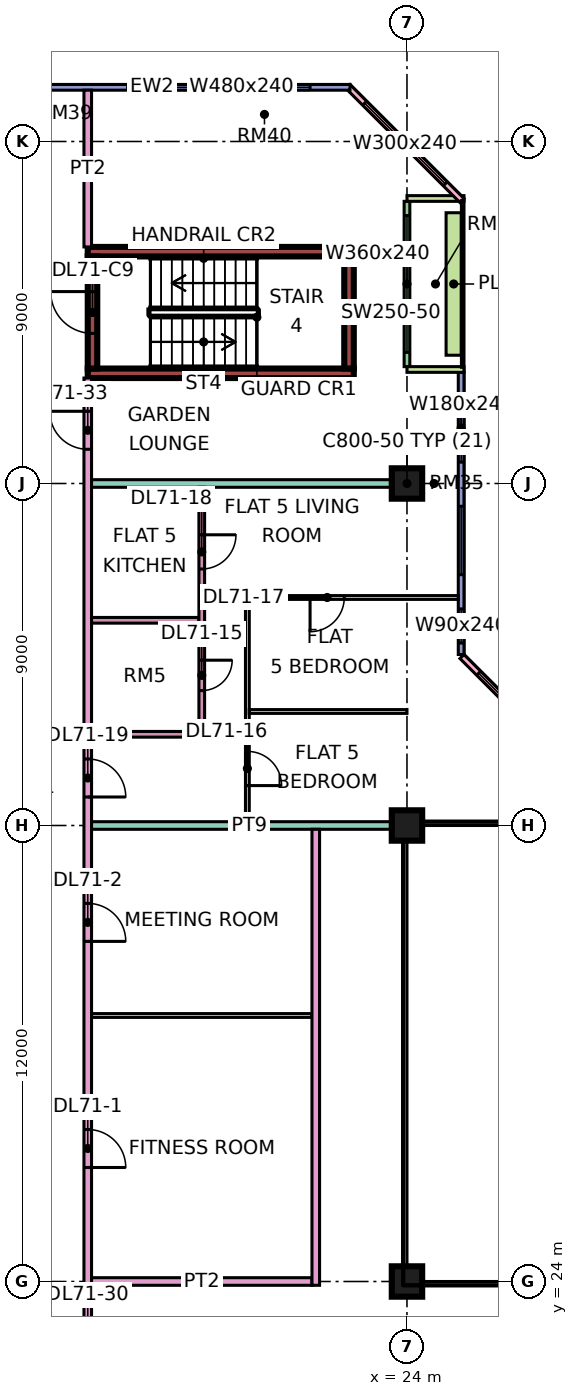
"""IFC4 building model, lengths in metres.
Left out: names, types, materials, properties, quantities, classifications, styles, units other than length and angle.
Written with IfcOpenShell. Run it as: python <this file> out.ifc"""

import sys

from ifc_helpers import new_model, si_unit, direction, frame, frame_2d, origin, origin_2d, place, context, subcontext, project, spatial, rectangle, extrude, element, fill, save


model = new_model("IFC4")
c1 = context("Model", 3, precision=1e-05, world=origin(), true_north=direction((0.0, 1.0)))
c2 = subcontext(c1, "Body", "Model", "MODEL_VIEW")
j1 = project(units=[si_unit("LENGTHUNIT", "METRE"), si_unit("PLANEANGLEUNIT", "RADIAN")], contexts=[c1])
p1 = place(None, origin())
s1 = spatial("IfcSite", under=j1, at=p1, CompositionType="ELEMENT")
p2 = place(p1, origin())
s2 = spatial("IfcBuilding", under=s1, at=p2, CompositionType="ELEMENT")
p3 = place(p2, frame((0.0, 0.0, 303.4)))
s3 = spatial("IfcBuildingStorey", under=s2, at=p3, CompositionType="ELEMENT", Elevation=303.4)
for number, where, z_axis, x_axis in (
    (1, (24.0, 24.0, 0.0), (0.0, 0.0, 1.0), (1.0, 0.0, 0.0)),
    (2, (24.0, 36.0, 0.0), (0.0, 0.0, 1.0), (1.0, 0.0, 0.0)),
    (3, (24.0, 45.0, 0.0), (0.0, 0.0, 1.0), (1.0, 0.0, 0.0)),
):
    element("IfcColumn", number, at=place(p3, frame(where, z_axis=z_axis, x_axis=x_axis)), inside=s3, PredefinedType="COLUMN", context=c2, shape_type="SweptSolid", body=[
        extrude(rectangle(XDim=0.8, YDim=0.8, at=origin_2d()), origin(), (0.0, 0.0, 1.0), 3.75),
    ])
for number, where, z_axis, x_axis in (
    (4, (15.6, 47.9, 0.0), (0.0, 0.0, 1.0), (1.0, 0.0, 0.0)),
    (5, (15.6, 51.1, 0.0), (0.0, 0.0, 1.0), (1.0, 0.0, 0.0)),
):
    element("IfcWall", number, at=place(p3, frame(where, z_axis=z_axis, x_axis=x_axis)), inside=s3, PredefinedType="SHEAR", context=c2, shape_type="SweptSolid", body=[
        extrude(rectangle(XDim=7.0, YDim=0.25, at=frame_2d((3.5, 0.0))), origin(), (0.0, 0.0, 1.0), 3.75),
    ])
p4 = place(p3, frame((15.725, 48.025, 0.0), z_axis=(0.0, 0.0, 1.0), x_axis=(0.0, 1.0, 0.0)))
e6 = element("IfcWall", 6, at=p4, inside=s3, PredefinedType="SHEAR", context=c2, shape_type="SweptSolid", body=[
    extrude(rectangle(XDim=2.95, YDim=0.25, at=frame_2d((1.475, 0.0))), origin(), (0.0, 0.0, 1.0), 3.75),
])
p5 = place(p4, frame((0.925, 0.0, 0.0)))
e7 = element("IfcOpeningElement", 7, at=p5, cuts=e6, PredefinedType="OPENING", context=c2, shape_type="SweptSolid", body=[
    extrude(rectangle(XDim=1.1, YDim=2.2, at=frame_2d((0.55, 1.1))), frame((0.0, 0.135, 0.0), z_axis=(0.0, -1.0, 0.0), x_axis=(1.0, 0.0, 0.0)), (0.0, 0.0, 1.0), 0.27),
])
p6 = place(p3, frame((22.475, 48.025, 0.0), z_axis=(0.0, 0.0, 1.0), x_axis=(0.0, 1.0, 0.0)))
e8 = element("IfcWall", 8, at=p6, inside=s3, PredefinedType="SHEAR", context=c2, shape_type="SweptSolid", body=[
    extrude(rectangle(XDim=2.95, YDim=0.25, at=frame_2d((1.475, 0.0))), origin(), (0.0, 0.0, 1.0), 3.75),
])
p7 = place(p3, frame((28.447, 37.447, 0.0), z_axis=(0.0, 0.0, 1.0), x_axis=(-0.707106781187, 0.707106781187, 0.0)))
e9 = element("IfcWall", 9, at=p7, inside=s3, PredefinedType="SOLIDWALL", context=c2, shape_type="SweptSolid", body=[
    extrude(rectangle(XDim=4.243, YDim=0.15, at=frame_2d((2.121, 0.0))), origin(), (0.0, 0.0, 1.0), 3.35),
])
p8 = place(p7, frame((0.621, 0.0, 0.45)))
e10 = element("IfcOpeningElement", 10, at=p8, cuts=e9, PredefinedType="OPENING", context=c2, shape_type="SweptSolid", body=[
    extrude(rectangle(XDim=3.0, YDim=2.4, at=frame_2d((1.5, 1.2))), frame((0.0, 0.085, 0.0), z_axis=(0.0, -1.0, 0.0), x_axis=(1.0, 0.0, 0.0)), (0.0, 0.0, 1.0), 0.17),
])
p9 = place(p3, frame((25.425, 40.5, 0.0), z_axis=(0.0, 0.0, 1.0), x_axis=(0.0, 1.0, 0.0)))
e11 = element("IfcWall", 11, at=p9, inside=s3, PredefinedType="SOLIDWALL", context=c2, shape_type="SweptSolid", body=[
    extrude(rectangle(XDim=7.425, YDim=0.15, at=frame_2d((3.712, 0.0))), origin(), (0.0, 0.0, 1.0), 3.35),
])
p10 = place(p9, frame((0.3, 0.0, 0.45)))
e12 = element("IfcOpeningElement", 12, at=p10, cuts=e11, PredefinedType="OPENING", context=c2, shape_type="SweptSolid", body=[
    extrude(rectangle(XDim=0.9, YDim=2.4, at=frame_2d((0.45, 1.2))), frame((0.0, 0.085, 0.0), z_axis=(0.0, -1.0, 0.0), x_axis=(1.0, 0.0, 0.0)), (0.0, 0.0, 1.0), 0.17),
])
p11 = place(p9, frame((2.1, 0.0, 0.45)))
e13 = element("IfcOpeningElement", 13, at=p11, cuts=e11, PredefinedType="OPENING", context=c2, shape_type="SweptSolid", body=[
    extrude(rectangle(XDim=1.8, YDim=2.4, at=frame_2d((0.9, 1.2))), frame((0.0, 0.085, 0.0), z_axis=(0.0, -1.0, 0.0), x_axis=(1.0, 0.0, 0.0)), (0.0, 0.0, 1.0), 0.17),
])
p12 = place(p9, frame((5.062, 0.0, 0.45)))
e14 = element("IfcOpeningElement", 14, at=p12, cuts=e11, PredefinedType="OPENING", context=c2, shape_type="SweptSolid", body=[
    extrude(rectangle(XDim=1.8, YDim=2.4, at=frame_2d((0.9, 1.2))), frame((0.0, 0.085, 0.0), z_axis=(0.0, -1.0, 0.0), x_axis=(1.0, 0.0, 0.0)), (0.0, 0.0, 1.0), 0.17),
])
p13 = place(p3, frame((24.0, 48.075, 0.0), z_axis=(0.0, 0.0, 1.0), x_axis=(0.0, 1.0, 0.0)))
e15 = element("IfcWall", 15, at=p13, inside=s3, PredefinedType="SOLIDWALL", context=c2, shape_type="SweptSolid", body=[
    extrude(rectangle(XDim=4.35, YDim=0.15, at=frame_2d((2.175, 0.0))), origin(), (0.0, 0.0, 1.0), 3.35),
])
p14 = place(p13, frame((0.375, 0.0, 0.45)))
e16 = element("IfcOpeningElement", 16, at=p14, cuts=e15, PredefinedType="OPENING", context=c2, shape_type="SweptSolid", body=[
    extrude(rectangle(XDim=3.6, YDim=2.4, at=frame_2d((1.8, 1.2))), frame((0.0, 0.085, 0.0), z_axis=(0.0, -1.0, 0.0), x_axis=(1.0, 0.0, 0.0)), (0.0, 0.0, 1.0), 0.17),
])
for number, where, z_axis, x_axis in (
    (17, (25.5, 48.0, 0.0), (0.0, 0.0, 1.0), (-1.0, 0.0, 0.0)),
    (18, (25.5, 52.5, 0.0), (0.0, 0.0, 1.0), (-1.0, 0.0, 0.0)),
):
    element("IfcWall", number, at=place(p3, frame(where, z_axis=z_axis, x_axis=x_axis)), inside=s3, PredefinedType="SOLIDWALL", context=c2, shape_type="SweptSolid", body=[
        extrude(rectangle(XDim=1.5, YDim=0.15, at=frame_2d((0.75, 0.0))), origin(), (0.0, 0.0, 1.0), 3.35),
    ])
p15 = place(p3, frame((25.447, 52.447, 0.0), z_axis=(0.0, 0.0, 1.0), x_axis=(-0.707106781187, 0.707106781187, 0.0)))
e19 = element("IfcWall", 19, at=p15, inside=s3, PredefinedType="SOLIDWALL", context=c2, shape_type="SweptSolid", body=[
    extrude(rectangle(XDim=4.243, YDim=0.15, at=frame_2d((2.121, 0.0))), origin(), (0.0, 0.0, 1.0), 3.35),
])
p16 = place(p15, frame((0.621, 0.0, 0.45)))
e20 = element("IfcOpeningElement", 20, at=p16, cuts=e19, PredefinedType="OPENING", context=c2, shape_type="SweptSolid", body=[
    extrude(rectangle(XDim=3.0, YDim=2.4, at=frame_2d((1.5, 1.2))), frame((0.0, 0.085, 0.0), z_axis=(0.0, -1.0, 0.0), x_axis=(1.0, 0.0, 0.0)), (0.0, 0.0, 1.0), 0.17),
])
p17 = place(p3, frame((22.5, 55.425, 0.0), z_axis=(0.0, 0.0, 1.0), x_axis=(-1.0, 0.0, 0.0)))
e21 = element("IfcWall", 21, at=p17, inside=s3, PredefinedType="SOLIDWALL", context=c2, shape_type="SweptSolid", body=[
    extrude(rectangle(XDim=10.425, YDim=0.15, at=frame_2d((5.212, 0.0))), origin(), (0.0, 0.0, 1.0), 3.35),
])
p18 = place(p17, frame((1.05, 0.0, 0.45)))
e22 = element("IfcOpeningElement", 22, at=p18, cuts=e21, PredefinedType="OPENING", context=c2, shape_type="SweptSolid", body=[
    extrude(rectangle(XDim=4.8, YDim=2.4, at=frame_2d((2.4, 1.2))), frame((0.0, 0.085, 0.0), z_axis=(0.0, -1.0, 0.0), x_axis=(1.0, 0.0, 0.0)), (0.0, 0.0, 1.0), 0.17),
])
p19 = place(p3, frame((25.229, 48.375, 0.0), z_axis=(0.0, 0.0, 1.0), x_axis=(0.0, 1.0, 0.0)))
e23 = element("IfcWall", 23, at=p19, inside=s3, PredefinedType="SOLIDWALL", context=c2, shape_type="SweptSolid", body=[
    extrude(rectangle(XDim=3.75, YDim=0.4, at=frame_2d((1.875, 0.0))), origin(), (0.0, 0.0, 1.0), 0.7),
])
p20 = place(p3, frame((15.6, 20.0, 0.0), z_axis=(0.0, 0.0, 1.0), x_axis=(0.0, 1.0, 0.0)))
e24 = element("IfcWall", 24, at=p20, inside=s3, PredefinedType="PARTITIONING", context=c2, shape_type="SweptSolid", body=[
    extrude(rectangle(XDim=27.775, YDim=0.2, at=frame_2d((13.887, 0.0))), origin(), (0.0, 0.0, 1.0), 3.35),
])
p21 = place(p20, frame((7.0, 0.0, 0.0)))
e25 = element("IfcOpeningElement", 25, at=p21, cuts=e24, PredefinedType="OPENING", context=c2, shape_type="SweptSolid", body=[
    extrude(rectangle(XDim=1.0, YDim=2.1, at=frame_2d((0.5, 1.05))), frame((0.0, 0.11, 0.0), z_axis=(0.0, -1.0, 0.0), x_axis=(1.0, 0.0, 0.0)), (0.0, 0.0, 1.0), 0.22),
])
p22 = place(p20, frame((12.95, 0.0, 0.0)))
e26 = element("IfcOpeningElement", 26, at=p22, cuts=e24, PredefinedType="OPENING", context=c2, shape_type="SweptSolid", body=[
    extrude(rectangle(XDim=1.0, YDim=2.1, at=frame_2d((0.5, 1.05))), frame((0.0, 0.11, 0.0), z_axis=(0.0, -1.0, 0.0), x_axis=(1.0, 0.0, 0.0)), (0.0, 0.0, 1.0), 0.22),
])
p23 = place(p20, frame((16.75, 0.0, 0.0)))
e27 = element("IfcOpeningElement", 27, at=p23, cuts=e24, PredefinedType="OPENING", context=c2, shape_type="SweptSolid", body=[
    extrude(rectangle(XDim=1.0, YDim=2.1, at=frame_2d((0.5, 1.05))), frame((0.0, 0.11, 0.0), z_axis=(0.0, -1.0, 0.0), x_axis=(1.0, 0.0, 0.0)), (0.0, 0.0, 1.0), 0.22),
])
p24 = place(p20, frame((1.15, 0.0, 0.0)))
e28 = element("IfcOpeningElement", 28, at=p24, cuts=e24, PredefinedType="OPENING", context=c2, shape_type="SweptSolid", body=[
    extrude(rectangle(XDim=1.8, YDim=2.1, at=frame_2d((0.9, 1.05))), frame((0.0, 0.11, 0.0), z_axis=(0.0, -1.0, 0.0), x_axis=(1.0, 0.0, 0.0)), (0.0, 0.0, 1.0), 0.22),
])
p25 = place(p20, frame((25.9, 0.0, 0.0)))
e29 = element("IfcOpeningElement", 29, at=p25, cuts=e24, PredefinedType="OPENING", context=c2, shape_type="SweptSolid", body=[
    extrude(rectangle(XDim=1.0, YDim=2.1, at=frame_2d((0.5, 1.05))), frame((0.0, 0.11, 0.0), z_axis=(0.0, -1.0, 0.0), x_axis=(1.0, 0.0, 0.0)), (0.0, 0.0, 1.0), 0.22),
])
p26 = place(p3, frame((15.6, 51.225, 0.0), z_axis=(0.0, 0.0, 1.0), x_axis=(0.0, 1.0, 0.0)))
e30 = element("IfcWall", 30, at=p26, inside=s3, PredefinedType="PARTITIONING", context=c2, shape_type="SweptSolid", body=[
    extrude(rectangle(XDim=4.125, YDim=0.2, at=frame_2d((2.062, 0.0))), origin(), (0.0, 0.0, 1.0), 3.35),
])
p27 = place(p3, frame((15.7, 24.0, 0.0), z_axis=(0.0, 0.0, 1.0), x_axis=(1.0, 0.0, 0.0)))
e31 = element("IfcWall", 31, at=p27, inside=s3, PredefinedType="PARTITIONING", context=c2, shape_type="SweptSolid", body=[
    extrude(rectangle(XDim=5.8, YDim=0.2, at=frame_2d((2.9, 0.0))), origin(), (0.0, 0.0, 1.0), 3.35),
])
p28 = place(p3, frame((15.7, 31.0, 0.0), z_axis=(0.0, 0.0, 1.0), x_axis=(1.0, 0.0, 0.0)))
e32 = element("IfcWall", 32, at=p28, inside=s3, PredefinedType="PARTITIONING", context=c2, shape_type="SweptSolid", body=[
    extrude(rectangle(XDim=5.8, YDim=0.1, at=frame_2d((2.9, 0.0))), origin(), (0.0, 0.0, 1.0), 3.35),
])
p29 = place(p3, frame((15.7, 36.0, 0.0), z_axis=(0.0, 0.0, 1.0), x_axis=(1.0, 0.0, 0.0)))
e33 = element("IfcWall", 33, at=p29, inside=s3, PredefinedType="PARTITIONING", context=c2, shape_type="SweptSolid", body=[
    extrude(rectangle(XDim=8.3, YDim=0.2, at=frame_2d((4.15, 0.0))), origin(), (0.0, 0.0, 1.0), 3.35),
])
for number, where, z_axis, x_axis in (
    (34, (15.7, 38.4, 0.0), (0.0, 0.0, 1.0), (1.0, 0.0, 0.0)),
    (35, (15.7, 41.4, 0.0), (0.0, 0.0, 1.0), (1.0, 0.0, 0.0)),
):
    element("IfcWall", number, at=place(p3, frame(where, z_axis=z_axis, x_axis=x_axis)), inside=s3, PredefinedType="PARTITIONING", context=c2, shape_type="SweptSolid", body=[
        extrude(rectangle(XDim=2.825, YDim=0.15, at=frame_2d((1.413, 0.0))), origin(), (0.0, 0.0, 1.0), 3.35),
    ])
p30 = place(p3, frame((15.7, 45.0, 0.0), z_axis=(0.0, 0.0, 1.0), x_axis=(1.0, 0.0, 0.0)))
e36 = element("IfcWall", 36, at=p30, inside=s3, PredefinedType="PARTITIONING", context=c2, shape_type="SweptSolid", body=[
    extrude(rectangle(XDim=8.3, YDim=0.2, at=frame_2d((4.15, 0.0))), origin(), (0.0, 0.0, 1.0), 3.35),
])
p31 = place(p3, frame((18.6, 38.325, 0.0), z_axis=(0.0, 0.0, 1.0), x_axis=(0.0, 1.0, 0.0)))
e37 = element("IfcWall", 37, at=p31, inside=s3, PredefinedType="PARTITIONING", context=c2, shape_type="SweptSolid", body=[
    extrude(rectangle(XDim=6.575, YDim=0.15, at=frame_2d((3.288, 0.0))), origin(), (0.0, 0.0, 1.0), 3.35),
])
p32 = place(p31, frame((1.225, 0.0, 0.0)))
e38 = element("IfcOpeningElement", 38, at=p32, cuts=e37, PredefinedType="OPENING", context=c2, shape_type="SweptSolid", body=[
    extrude(rectangle(XDim=0.8, YDim=2.1, at=frame_2d((0.4, 1.05))), frame((0.0, 0.085, 0.0), z_axis=(0.0, -1.0, 0.0), x_axis=(1.0, 0.0, 0.0)), (0.0, 0.0, 1.0), 0.17),
])
p33 = place(p31, frame((4.425, 0.0, 0.0)))
e39 = element("IfcOpeningElement", 39, at=p33, cuts=e37, PredefinedType="OPENING", context=c2, shape_type="SweptSolid", body=[
    extrude(rectangle(XDim=0.9, YDim=2.1, at=frame_2d((0.45, 1.05))), frame((0.0, 0.085, 0.0), z_axis=(0.0, -1.0, 0.0), x_axis=(1.0, 0.0, 0.0)), (0.0, 0.0, 1.0), 0.17),
])
p34 = place(p3, frame((19.8, 36.1, 0.0), z_axis=(0.0, 0.0, 1.0), x_axis=(0.0, 1.0, 0.0)))
e40 = element("IfcWall", 40, at=p34, inside=s3, PredefinedType="PARTITIONING", context=c2, shape_type="SweptSolid", body=[
    extrude(rectangle(XDim=5.95, YDim=0.1, at=frame_2d((2.975, 0.0))), origin(), (0.0, 0.0, 1.0), 3.35),
])
p35 = place(p34, frame((0.95, 0.0, 0.0)))
e41 = element("IfcOpeningElement", 41, at=p35, cuts=e40, PredefinedType="OPENING", context=c2, shape_type="SweptSolid", body=[
    extrude(rectangle(XDim=0.9, YDim=2.1, at=frame_2d((0.45, 1.05))), frame((0.0, 0.06, 0.0), z_axis=(0.0, -1.0, 0.0), x_axis=(1.0, 0.0, 0.0)), (0.0, 0.0, 1.0), 0.12),
])
p36 = place(p3, frame((19.85, 39.0, 0.0), z_axis=(0.0, 0.0, 1.0), x_axis=(1.0, 0.0, 0.0)))
e42 = element("IfcWall", 42, at=p36, inside=s3, PredefinedType="PARTITIONING", context=c2, shape_type="SweptSolid", body=[
    extrude(rectangle(XDim=4.15, YDim=0.1, at=frame_2d((2.075, 0.0))), origin(), (0.0, 0.0, 1.0), 3.35),
])
p37 = place(p3, frame((19.85, 42.0, 0.0), z_axis=(0.0, 0.0, 1.0), x_axis=(1.0, 0.0, 0.0)))
e43 = element("IfcWall", 43, at=p37, inside=s3, PredefinedType="PARTITIONING", context=c2, shape_type="SweptSolid", body=[
    extrude(rectangle(XDim=5.5, YDim=0.1, at=frame_2d((2.75, 0.0))), origin(), (0.0, 0.0, 1.0), 3.35),
])
p38 = place(p37, frame((1.6, 0.0, 0.0)))
e44 = element("IfcOpeningElement", 44, at=p38, cuts=e43, PredefinedType="OPENING", context=c2, shape_type="SweptSolid", body=[
    extrude(rectangle(XDim=0.9, YDim=2.1, at=frame_2d((0.45, 1.05))), frame((0.0, 0.06, 0.0), z_axis=(0.0, -1.0, 0.0), x_axis=(1.0, 0.0, 0.0)), (0.0, 0.0, 1.0), 0.12),
])
p39 = place(p3, frame((21.6, 23.9, 0.0), z_axis=(0.0, 0.0, 1.0), x_axis=(0.0, 1.0, 0.0)))
e45 = element("IfcWall", 45, at=p39, inside=s3, PredefinedType="PARTITIONING", context=c2, shape_type="SweptSolid", body=[
    extrude(rectangle(XDim=12.0, YDim=0.2, at=frame_2d((6.0, 0.0))), origin(), (0.0, 0.0, 1.0), 3.35),
])
p40 = place(p8, origin())
e46 = element("IfcWindow", 46, at=p40, inside=s3, PartitioningType="SINGLE_PANEL", PredefinedType="WINDOW", context=c2, shape_type="SweptSolid", body=[
    extrude(rectangle(XDim=3.0, YDim=2.4, at=frame_2d((1.5, 1.2))), frame((0.0, 0.03, 0.0), z_axis=(0.0, -1.0, 0.0), x_axis=(1.0, 0.0, 0.0)), (0.0, 0.0, 1.0), 0.06),
])
fill(e10, e46)
p41 = place(p10, origin())
e47 = element("IfcWindow", 47, at=p41, inside=s3, PartitioningType="SINGLE_PANEL", PredefinedType="WINDOW", context=c2, shape_type="SweptSolid", body=[
    extrude(rectangle(XDim=0.9, YDim=2.4, at=frame_2d((0.45, 1.2))), frame((0.0, 0.03, 0.0), z_axis=(0.0, -1.0, 0.0), x_axis=(1.0, 0.0, 0.0)), (0.0, 0.0, 1.0), 0.06),
])
fill(e12, e47)
p42 = place(p11, origin())
e48 = element("IfcWindow", 48, at=p42, inside=s3, PartitioningType="SINGLE_PANEL", PredefinedType="WINDOW", context=c2, shape_type="SweptSolid", body=[
    extrude(rectangle(XDim=1.8, YDim=2.4, at=frame_2d((0.9, 1.2))), frame((0.0, 0.03, 0.0), z_axis=(0.0, -1.0, 0.0), x_axis=(1.0, 0.0, 0.0)), (0.0, 0.0, 1.0), 0.06),
])
fill(e13, e48)
p43 = place(p12, origin())
e49 = element("IfcWindow", 49, at=p43, inside=s3, PartitioningType="SINGLE_PANEL", PredefinedType="WINDOW", context=c2, shape_type="SweptSolid", body=[
    extrude(rectangle(XDim=1.8, YDim=2.4, at=frame_2d((0.9, 1.2))), frame((0.0, 0.03, 0.0), z_axis=(0.0, -1.0, 0.0), x_axis=(1.0, 0.0, 0.0)), (0.0, 0.0, 1.0), 0.06),
])
fill(e14, e49)
p44 = place(p14, origin())
e50 = element("IfcWindow", 50, at=p44, inside=s3, PartitioningType="SINGLE_PANEL", PredefinedType="WINDOW", context=c2, shape_type="SweptSolid", body=[
    extrude(rectangle(XDim=3.6, YDim=2.4, at=frame_2d((1.8, 1.2))), frame((0.0, 0.03, 0.0), z_axis=(0.0, -1.0, 0.0), x_axis=(1.0, 0.0, 0.0)), (0.0, 0.0, 1.0), 0.06),
])
fill(e16, e50)
p45 = place(p16, origin())
e51 = element("IfcWindow", 51, at=p45, inside=s3, PartitioningType="SINGLE_PANEL", PredefinedType="WINDOW", context=c2, shape_type="SweptSolid", body=[
    extrude(rectangle(XDim=3.0, YDim=2.4, at=frame_2d((1.5, 1.2))), frame((0.0, 0.03, 0.0), z_axis=(0.0, -1.0, 0.0), x_axis=(1.0, 0.0, 0.0)), (0.0, 0.0, 1.0), 0.06),
])
fill(e20, e51)
p46 = place(p18, origin())
e52 = element("IfcWindow", 52, at=p46, inside=s3, PartitioningType="SINGLE_PANEL", PredefinedType="WINDOW", context=c2, shape_type="SweptSolid", body=[
    extrude(rectangle(XDim=4.8, YDim=2.4, at=frame_2d((2.4, 1.2))), frame((0.0, 0.03, 0.0), z_axis=(0.0, -1.0, 0.0), x_axis=(1.0, 0.0, 0.0)), (0.0, 0.0, 1.0), 0.06),
])
fill(e22, e52)
p47 = place(p5, frame((1.1, 0.0, 0.0), z_axis=(0.0, 0.0, 1.0), x_axis=(-1.0, 0.0, 0.0)))
e53 = element("IfcDoor", 53, at=p47, inside=s3, OperationType="SINGLE_SWING_RIGHT", PredefinedType="DOOR", context=c2, shape_type="SweptSolid", body=[
    extrude(rectangle(XDim=1.1, YDim=2.2, at=frame_2d((0.55, 1.1))), frame((0.0, 0.025, 0.0), z_axis=(0.0, -1.0, 0.0), x_axis=(1.0, 0.0, 0.0)), (0.0, 0.0, 1.0), 0.05),
])
fill(e7, e53)
p48 = place(p21, frame((1.0, 0.0, 0.0), z_axis=(0.0, 0.0, 1.0), x_axis=(-1.0, 0.0, 0.0)))
e54 = element("IfcDoor", 54, at=p48, inside=s3, OperationType="SINGLE_SWING_LEFT", PredefinedType="DOOR", context=c2, shape_type="SweptSolid", body=[
    extrude(rectangle(XDim=1.0, YDim=2.1, at=frame_2d((0.5, 1.05))), frame((0.0, 0.025, 0.0), z_axis=(0.0, -1.0, 0.0), x_axis=(1.0, 0.0, 0.0)), (0.0, 0.0, 1.0), 0.05),
])
fill(e25, e54)
p49 = place(p22, frame((1.0, 0.0, 0.0), z_axis=(0.0, 0.0, 1.0), x_axis=(-1.0, 0.0, 0.0)))
e55 = element("IfcDoor", 55, at=p49, inside=s3, OperationType="SINGLE_SWING_LEFT", PredefinedType="DOOR", context=c2, shape_type="SweptSolid", body=[
    extrude(rectangle(XDim=1.0, YDim=2.1, at=frame_2d((0.5, 1.05))), frame((0.0, 0.025, 0.0), z_axis=(0.0, -1.0, 0.0), x_axis=(1.0, 0.0, 0.0)), (0.0, 0.0, 1.0), 0.05),
])
fill(e26, e55)
p50 = place(p32, origin())
e56 = element("IfcDoor", 56, at=p50, inside=s3, OperationType="SINGLE_SWING_RIGHT", PredefinedType="DOOR", context=c2, shape_type="SweptSolid", body=[
    extrude(rectangle(XDim=0.8, YDim=2.1, at=frame_2d((0.4, 1.05))), frame((0.0, 0.025, 0.0), z_axis=(0.0, -1.0, 0.0), x_axis=(1.0, 0.0, 0.0)), (0.0, 0.0, 1.0), 0.05),
])
fill(e38, e56)
p51 = place(p35, frame((0.9, 0.0, 0.0), z_axis=(0.0, 0.0, 1.0), x_axis=(-1.0, 0.0, 0.0)))
e57 = element("IfcDoor", 57, at=p51, inside=s3, OperationType="SINGLE_SWING_LEFT", PredefinedType="DOOR", context=c2, shape_type="SweptSolid", body=[
    extrude(rectangle(XDim=0.9, YDim=2.1, at=frame_2d((0.45, 1.05))), frame((0.0, 0.025, 0.0), z_axis=(0.0, -1.0, 0.0), x_axis=(1.0, 0.0, 0.0)), (0.0, 0.0, 1.0), 0.05),
])
fill(e41, e57)
p52 = place(p38, frame((0.9, 0.0, 0.0), z_axis=(0.0, 0.0, 1.0), x_axis=(-1.0, 0.0, 0.0)))
e58 = element("IfcDoor", 58, at=p52, inside=s3, OperationType="SINGLE_SWING_LEFT", PredefinedType="DOOR", context=c2, shape_type="SweptSolid", body=[
    extrude(rectangle(XDim=0.9, YDim=2.1, at=frame_2d((0.45, 1.05))), frame((0.0, 0.025, 0.0), z_axis=(0.0, -1.0, 0.0), x_axis=(1.0, 0.0, 0.0)), (0.0, 0.0, 1.0), 0.05),
])
fill(e44, e58)
p53 = place(p33, origin())
e59 = element("IfcDoor", 59, at=p53, inside=s3, OperationType="SINGLE_SWING_RIGHT", PredefinedType="DOOR", context=c2, shape_type="SweptSolid", body=[
    extrude(rectangle(XDim=0.9, YDim=2.1, at=frame_2d((0.45, 1.05))), frame((0.0, 0.025, 0.0), z_axis=(0.0, -1.0, 0.0), x_axis=(1.0, 0.0, 0.0)), (0.0, 0.0, 1.0), 0.05),
])
fill(e39, e59)
p54 = place(p23, frame((1.0, 0.0, 0.0), z_axis=(0.0, 0.0, 1.0), x_axis=(-1.0, 0.0, 0.0)))
e60 = element("IfcDoor", 60, at=p54, inside=s3, OperationType="SINGLE_SWING_LEFT", PredefinedType="DOOR", context=c2, shape_type="SweptSolid", body=[
    extrude(rectangle(XDim=1.0, YDim=2.1, at=frame_2d((0.5, 1.05))), frame((0.0, 0.025, 0.0), z_axis=(0.0, -1.0, 0.0), x_axis=(1.0, 0.0, 0.0)), (0.0, 0.0, 1.0), 0.05),
])
fill(e27, e60)
p55 = place(p25, frame((1.0, 0.0, 0.0), z_axis=(0.0, 0.0, 1.0), x_axis=(-1.0, 0.0, 0.0)))
e61 = element("IfcDoor", 61, at=p55, inside=s3, OperationType="SINGLE_SWING_RIGHT", PredefinedType="DOOR", context=c2, shape_type="SweptSolid", body=[
    extrude(rectangle(XDim=1.0, YDim=2.1, at=frame_2d((0.5, 1.05))), frame((0.0, 0.025, 0.0), z_axis=(0.0, -1.0, 0.0), x_axis=(1.0, 0.0, 0.0)), (0.0, 0.0, 1.0), 0.05),
])
fill(e29, e61)
save(model, sys.argv[1])
